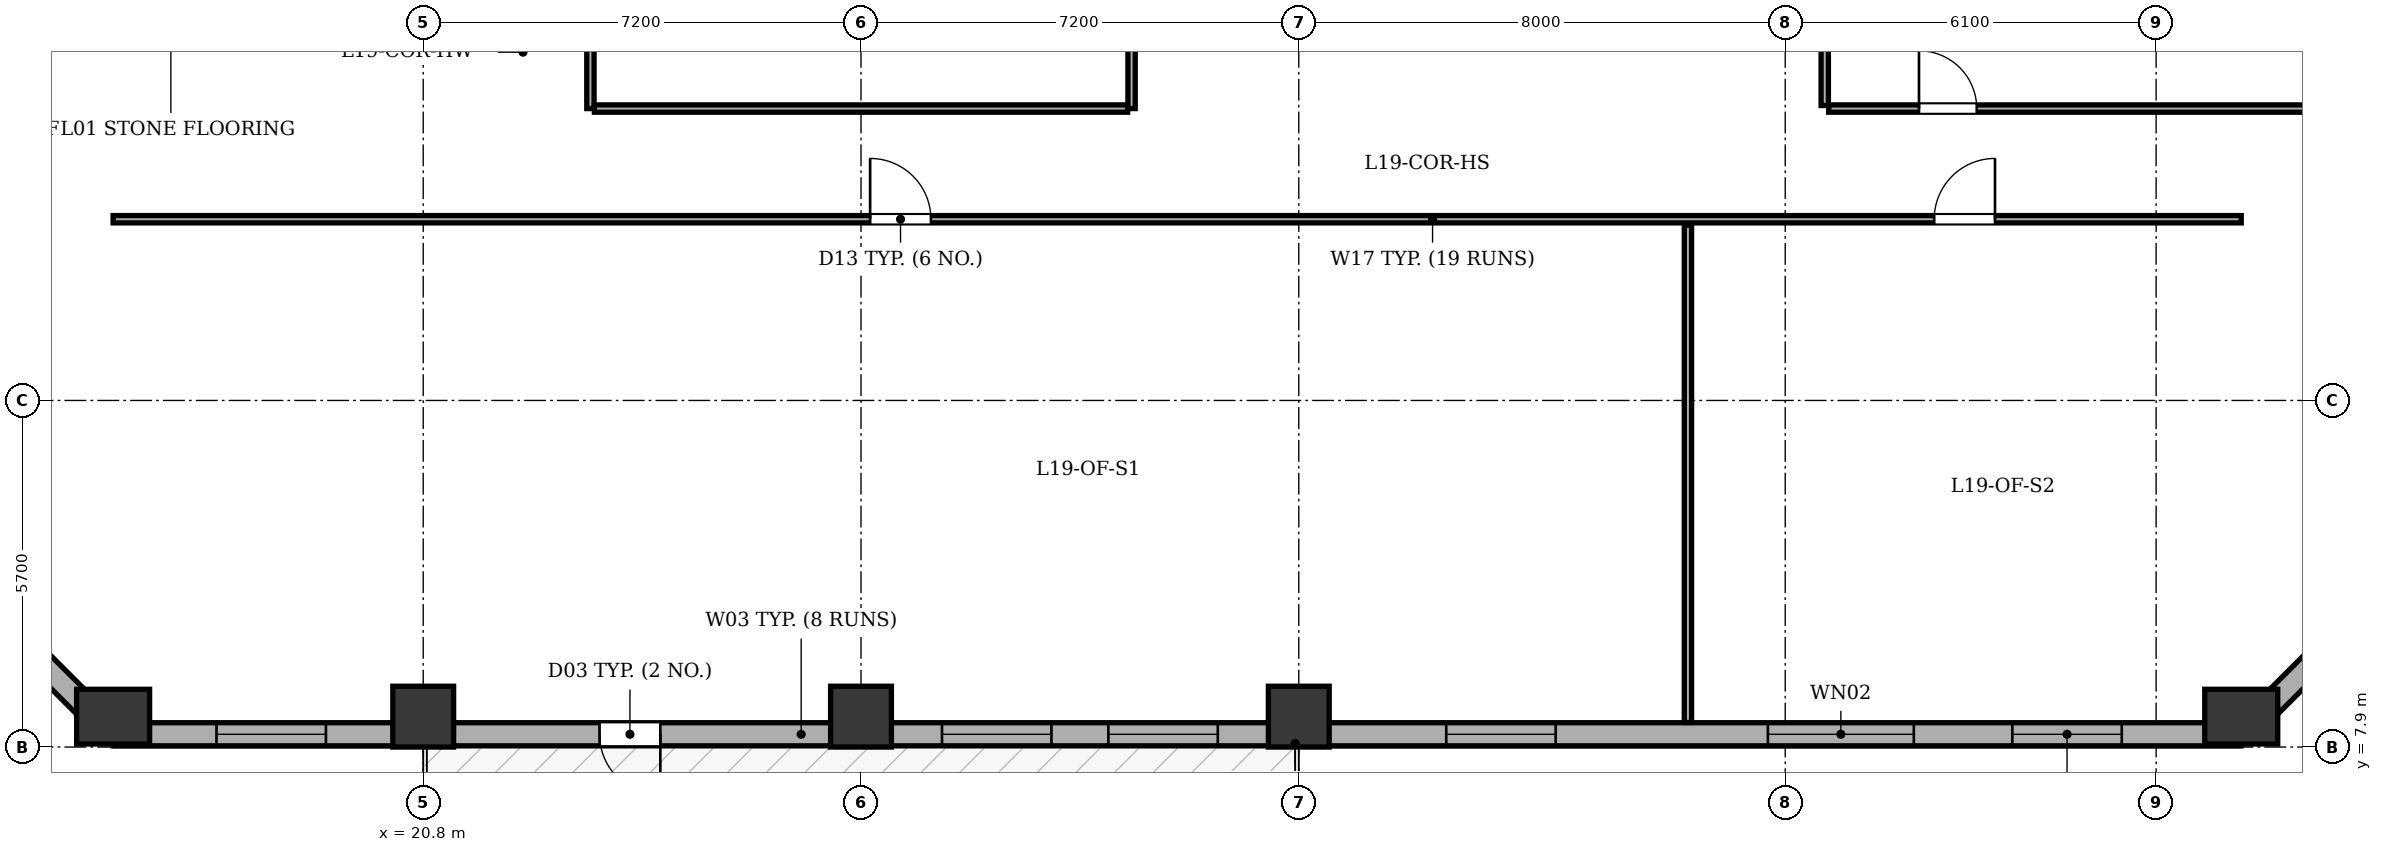
"""IFC4 building model, lengths in metres.
Left out: names, types, materials, properties, quantities, classifications, styles, units other than length and angle.
Written with IfcOpenShell. Run it as: python <this file> out.ifc"""

import sys

from ifc_helpers import new_model, si_unit, direction, frame, frame_2d, origin, origin_2d, place, context, subcontext, project, spatial, rectangle, extrude, element, fill, save


model = new_model("IFC4")
c1 = context("Model", 3, precision=1e-05, world=origin(), true_north=direction((0.0, 1.0)))
c2 = subcontext(c1, "Body", "Model", "MODEL_VIEW")
j1 = project(units=[si_unit("LENGTHUNIT", "METRE"), si_unit("PLANEANGLEUNIT", "RADIAN")], contexts=[c1])
p1 = place(None, origin())
s1 = spatial("IfcSite", under=j1, at=p1, CompositionType="ELEMENT")
p2 = place(p1, origin())
s2 = spatial("IfcBuilding", under=s1, at=p2, CompositionType="ELEMENT")
p3 = place(p2, frame((0.0, 0.0, 78.9)))
s3 = spatial("IfcBuildingStorey", under=s2, at=p3, CompositionType="ELEMENT", Elevation=78.9)
p4 = place(p3, frame((15.7, 8.4, 0.0), z_axis=(0.0, 0.0, 1.0), x_axis=(1.0, 0.0, 0.0)))
e1 = element("IfcColumn", 1, at=p4, inside=s3, PredefinedType="COLUMN", context=c2, shape_type="SweptSolid", body=[
    extrude(rectangle(XDim=0.9, YDim=1.2, at=origin_2d()), origin(), (0.0, 0.0, 1.0), 3.9),
])
for number, where, z_axis, x_axis in (
    (2, (20.8, 8.4, 0.0), (0.0, 0.0, 1.0), (1.0, 0.0, 0.0)),
    (3, (28.0, 8.4, 0.0), (0.0, 0.0, 1.0), (1.0, 0.0, 0.0)),
    (4, (35.2, 8.4, 0.0), (0.0, 0.0, 1.0), (1.0, 0.0, 0.0)),
):
    element("IfcColumn", number, at=place(p3, frame(where, z_axis=z_axis, x_axis=x_axis)), inside=s3, PredefinedType="COLUMN", context=c2, shape_type="SweptSolid", body=[
        extrude(rectangle(XDim=1.0, YDim=1.0, at=origin_2d()), origin(), (0.0, 0.0, 1.0), 3.9),
    ])
p5 = place(p3, frame((50.7, 8.4, 0.0), z_axis=(0.0, 0.0, 1.0), x_axis=(1.0, 0.0, 0.0)))
e5 = element("IfcColumn", 5, at=p5, inside=s3, PredefinedType="COLUMN", context=c2, shape_type="SweptSolid", body=[
    extrude(rectangle(XDim=0.9, YDim=1.2, at=origin_2d()), origin(), (0.0, 0.0, 1.0), 3.9),
])
p6 = place(p3, frame((50.7, 8.11, 0.0), z_axis=(0.0, 0.0, 1.0), x_axis=(-1.0, 0.0, 0.0)))
e6 = element("IfcWall", 6, at=p6, inside=s3, PredefinedType="STANDARD", context=c2, shape_type="SweptSolid", body=[
    extrude(rectangle(XDim=35.0, YDim=0.38, at=frame_2d((17.5, 0.0))), origin(), (0.0, 0.0, 1.0), 3.135),
])
p7 = place(p6, frame((26.0, 0.0, 0.0)))
e7 = element("IfcOpeningElement", 7, at=p7, cuts=e6, PredefinedType="OPENING", context=c2, shape_type="SweptSolid", body=[
    extrude(rectangle(XDim=1.0, YDim=2.02, at=frame_2d((0.5, 1.01))), frame((0.0, 0.2, 0.0), z_axis=(0.0, -1.0, 0.0), x_axis=(1.0, 0.0, 0.0)), (0.0, 0.0, 1.0), 0.4),
])
p8 = place(p6, frame((1.965, 0.0, 0.8)))
e8 = element("IfcOpeningElement", 8, at=p8, cuts=e6, PredefinedType="OPENING", context=c2, shape_type="SweptSolid", body=[
    extrude(rectangle(XDim=1.8, YDim=1.9, at=frame_2d((0.9, 0.95))), frame((0.0, 0.2, 0.0), z_axis=(0.0, -1.0, 0.0), x_axis=(1.0, 0.0, 0.0)), (0.0, 0.0, 1.0), 0.4),
])
p9 = place(p6, frame((5.385, 0.0, 0.8)))
e9 = element("IfcOpeningElement", 9, at=p9, cuts=e6, PredefinedType="OPENING", context=c2, shape_type="SweptSolid", body=[
    extrude(rectangle(XDim=2.4, YDim=1.9, at=frame_2d((1.2, 0.95))), frame((0.0, 0.2, 0.0), z_axis=(0.0, -1.0, 0.0), x_axis=(1.0, 0.0, 0.0)), (0.0, 0.0, 1.0), 0.4),
])
p10 = place(p6, frame((11.275, 0.0, 0.8)))
e10 = element("IfcOpeningElement", 10, at=p10, cuts=e6, PredefinedType="OPENING", context=c2, shape_type="SweptSolid", body=[
    extrude(rectangle(XDim=1.8, YDim=1.9, at=frame_2d((0.9, 0.95))), frame((0.0, 0.2, 0.0), z_axis=(0.0, -1.0, 0.0), x_axis=(1.0, 0.0, 0.0)), (0.0, 0.0, 1.0), 0.4),
])
p11 = place(p6, frame((16.832, 0.0, 0.8)))
e11 = element("IfcOpeningElement", 11, at=p11, cuts=e6, PredefinedType="OPENING", context=c2, shape_type="SweptSolid", body=[
    extrude(rectangle(XDim=1.8, YDim=1.9, at=frame_2d((0.9, 0.95))), frame((0.0, 0.2, 0.0), z_axis=(0.0, -1.0, 0.0), x_axis=(1.0, 0.0, 0.0)), (0.0, 0.0, 1.0), 0.4),
])
p12 = place(p6, frame((19.568, 0.0, 0.8)))
e12 = element("IfcOpeningElement", 12, at=p12, cuts=e6, PredefinedType="OPENING", context=c2, shape_type="SweptSolid", body=[
    extrude(rectangle(XDim=1.8, YDim=1.9, at=frame_2d((0.9, 0.95))), frame((0.0, 0.2, 0.0), z_axis=(0.0, -1.0, 0.0), x_axis=(1.0, 0.0, 0.0)), (0.0, 0.0, 1.0), 0.4),
])
p13 = place(p6, frame((31.5, 0.0, 0.8)))
e13 = element("IfcOpeningElement", 13, at=p13, cuts=e6, PredefinedType="OPENING", context=c2, shape_type="SweptSolid", body=[
    extrude(rectangle(XDim=1.8, YDim=1.9, at=frame_2d((0.9, 0.95))), frame((0.0, 0.2, 0.0), z_axis=(0.0, -1.0, 0.0), x_axis=(1.0, 0.0, 0.0)), (0.0, 0.0, 1.0), 0.4),
])
p14 = place(p3, frame((15.7, 8.11, 0.0), z_axis=(0.0, 0.0, 1.0), x_axis=(-0.707124801467, 0.707088760447, 0.0)))
e14 = element("IfcWall", 14, at=p14, inside=s3, PredefinedType="STANDARD", context=c2, shape_type="SweptSolid", body=[
    extrude(rectangle(XDim=6.774, YDim=0.38, at=frame_2d((3.387, 0.0))), origin(), (0.0, 0.0, 1.0), 3.135),
])
p15 = place(p14, frame((2.687, 0.0, 0.8)))
e15 = element("IfcOpeningElement", 15, at=p15, cuts=e14, PredefinedType="OPENING", context=c2, shape_type="SweptSolid", body=[
    extrude(rectangle(XDim=1.4, YDim=1.65, at=frame_2d((0.7, 0.825))), frame((0.0, 0.2, 0.0), z_axis=(0.0, -1.0, 0.0), x_axis=(1.0, 0.0, 0.0)), (0.0, 0.0, 1.0), 0.4),
])
p16 = place(p3, frame((55.49, 12.9, 0.0), z_axis=(0.0, 0.0, 1.0), x_axis=(-0.707124801467, -0.707088760447, 0.0)))
e16 = element("IfcWall", 16, at=p16, inside=s3, PredefinedType="STANDARD", context=c2, shape_type="SweptSolid", body=[
    extrude(rectangle(XDim=6.774, YDim=0.38, at=frame_2d((3.387, 0.0))), origin(), (0.0, 0.0, 1.0), 3.135),
])
p17 = place(p16, frame((2.687, 0.0, 0.8)))
e17 = element("IfcOpeningElement", 17, at=p17, cuts=e16, PredefinedType="OPENING", context=c2, shape_type="SweptSolid", body=[
    extrude(rectangle(XDim=1.4, YDim=1.65, at=frame_2d((0.7, 0.825))), frame((0.0, 0.2, 0.0), z_axis=(0.0, -1.0, 0.0), x_axis=(1.0, 0.0, 0.0)), (0.0, 0.0, 1.0), 0.4),
])
for number, where, z_axis, x_axis in (
    (18, (23.55, 18.4, 0.0), (0.0, 0.0, 1.0), (0.0, 1.0, 0.0)),
    (19, (32.45, 18.4, 0.0), (0.0, 0.0, 1.0), (0.0, 1.0, 0.0)),
):
    element("IfcWall", number, at=place(p3, frame(where, z_axis=z_axis, x_axis=x_axis)), inside=s3, PredefinedType="PARTITIONING", context=c2, shape_type="SweptSolid", body=[
        extrude(rectangle(XDim=3.485, YDim=0.12, at=frame_2d((1.743, 0.0))), origin(), (0.0, 0.0, 1.0), 3.6),
    ])
p18 = place(p3, frame((23.615, 18.4, 0.0), z_axis=(0.0, 0.0, 1.0), x_axis=(1.0, 0.0, 0.0)))
e20 = element("IfcWall", 20, at=p18, inside=s3, PredefinedType="PARTITIONING", context=c2, shape_type="SweptSolid", body=[
    extrude(rectangle(XDim=8.77, YDim=0.12, at=frame_2d((4.385, 0.0))), origin(), (0.0, 0.0, 1.0), 3.6),
])
p19 = place(p3, frame((15.7, 16.58, 0.0), z_axis=(0.0, 0.0, 1.0), x_axis=(1.0, 0.0, 0.0)))
e21 = element("IfcWall", 21, at=p19, inside=s3, PredefinedType="PARTITIONING", context=c2, shape_type="SweptSolid", body=[
    extrude(rectangle(XDim=35.0, YDim=0.12, at=frame_2d((17.5, 0.0))), origin(), (0.0, 0.0, 1.0), 3.6),
])
p20 = place(p19, frame((12.45, 0.0, 0.0)))
e22 = element("IfcOpeningElement", 22, at=p20, cuts=e21, PredefinedType="OPENING", context=c2, shape_type="SweptSolid", body=[
    extrude(rectangle(XDim=1.0, YDim=2.1, at=frame_2d((0.5, 1.05))), frame((0.0, 0.07, 0.0), z_axis=(0.0, -1.0, 0.0), x_axis=(1.0, 0.0, 0.0)), (0.0, 0.0, 1.0), 0.14),
])
p21 = place(p19, frame((29.95, 0.0, 0.0)))
e23 = element("IfcOpeningElement", 23, at=p21, cuts=e21, PredefinedType="OPENING", context=c2, shape_type="SweptSolid", body=[
    extrude(rectangle(XDim=1.0, YDim=2.1, at=frame_2d((0.5, 1.05))), frame((0.0, 0.07, 0.0), z_axis=(0.0, -1.0, 0.0), x_axis=(1.0, 0.0, 0.0)), (0.0, 0.0, 1.0), 0.14),
])
p22 = place(p3, frame((41.6, 8.305, 0.0), z_axis=(0.0, 0.0, 1.0), x_axis=(0.0, 1.0, 0.0)))
e24 = element("IfcWall", 24, at=p22, inside=s3, PredefinedType="PARTITIONING", context=c2, shape_type="SweptSolid", body=[
    extrude(rectangle(XDim=8.175, YDim=0.12, at=frame_2d((4.087, 0.0))), origin(), (0.0, 0.0, 1.0), 3.6),
])
p23 = place(p3, frame((43.85, 18.45, 0.0), z_axis=(0.0, 0.0, 1.0), x_axis=(0.0, 1.0, 0.0)))
e25 = element("IfcWall", 25, at=p23, inside=s3, PredefinedType="PARTITIONING", context=c2, shape_type="SweptSolid", body=[
    extrude(rectangle(XDim=17.5, YDim=0.12, at=frame_2d((8.75, 0.0))), origin(), (0.0, 0.0, 1.0), 3.6),
])
p24 = place(p3, frame((43.915, 18.4, 0.0), z_axis=(0.0, 0.0, 1.0), x_axis=(1.0, 0.0, 0.0)))
e26 = element("IfcWall", 26, at=p24, inside=s3, PredefinedType="PARTITIONING", context=c2, shape_type="SweptSolid", body=[
    extrude(rectangle(XDim=11.38, YDim=0.12, at=frame_2d((5.69, 0.0))), origin(), (0.0, 0.0, 1.0), 3.6),
])
p25 = place(p24, frame((1.485, 0.0, 0.0)))
e27 = element("IfcOpeningElement", 27, at=p25, cuts=e26, PredefinedType="OPENING", context=c2, shape_type="SweptSolid", body=[
    extrude(rectangle(XDim=0.95, YDim=2.1, at=frame_2d((0.475, 1.05))), frame((0.0, 0.07, 0.0), z_axis=(0.0, -1.0, 0.0), x_axis=(1.0, 0.0, 0.0)), (0.0, 0.0, 1.0), 0.14),
])
p26 = place(p7, origin())
e28 = element("IfcDoor", 28, at=p26, inside=s3, OperationType="SINGLE_SWING_LEFT", PredefinedType="DOOR", context=c2, shape_type="SweptSolid", body=[
    extrude(rectangle(XDim=1.0, YDim=2.02, at=frame_2d((0.5, 1.01))), frame((0.0, 0.025, 0.0), z_axis=(0.0, -1.0, 0.0), x_axis=(1.0, 0.0, 0.0)), (0.0, 0.0, 1.0), 0.05),
])
fill(e7, e28)
p27 = place(p8, origin())
e29 = element("IfcWindow", 29, at=p27, inside=s3, PartitioningType="SINGLE_PANEL", PredefinedType="WINDOW", context=c2, shape_type="SweptSolid", body=[
    extrude(rectangle(XDim=1.8, YDim=1.9, at=frame_2d((0.9, 0.95))), frame((0.0, -0.01, 0.0), z_axis=(0.0, -1.0, 0.0), x_axis=(1.0, 0.0, 0.0)), (0.0, 0.0, 1.0), 0.06),
])
fill(e8, e29)
p28 = place(p9, origin())
e30 = element("IfcWindow", 30, at=p28, inside=s3, PartitioningType="SINGLE_PANEL", PredefinedType="WINDOW", context=c2, shape_type="SweptSolid", body=[
    extrude(rectangle(XDim=2.4, YDim=1.9, at=frame_2d((1.2, 0.95))), frame((0.0, -0.01, 0.0), z_axis=(0.0, -1.0, 0.0), x_axis=(1.0, 0.0, 0.0)), (0.0, 0.0, 1.0), 0.06),
])
fill(e9, e30)
p29 = place(p10, origin())
e31 = element("IfcWindow", 31, at=p29, inside=s3, PartitioningType="SINGLE_PANEL", PredefinedType="WINDOW", context=c2, shape_type="SweptSolid", body=[
    extrude(rectangle(XDim=1.8, YDim=1.9, at=frame_2d((0.9, 0.95))), frame((0.0, -0.01, 0.0), z_axis=(0.0, -1.0, 0.0), x_axis=(1.0, 0.0, 0.0)), (0.0, 0.0, 1.0), 0.06),
])
fill(e10, e31)
p30 = place(p11, origin())
e32 = element("IfcWindow", 32, at=p30, inside=s3, PartitioningType="SINGLE_PANEL", PredefinedType="WINDOW", context=c2, shape_type="SweptSolid", body=[
    extrude(rectangle(XDim=1.8, YDim=1.9, at=frame_2d((0.9, 0.95))), frame((0.0, -0.01, 0.0), z_axis=(0.0, -1.0, 0.0), x_axis=(1.0, 0.0, 0.0)), (0.0, 0.0, 1.0), 0.06),
])
fill(e11, e32)
p31 = place(p12, origin())
e33 = element("IfcWindow", 33, at=p31, inside=s3, PartitioningType="SINGLE_PANEL", PredefinedType="WINDOW", context=c2, shape_type="SweptSolid", body=[
    extrude(rectangle(XDim=1.8, YDim=1.9, at=frame_2d((0.9, 0.95))), frame((0.0, -0.01, 0.0), z_axis=(0.0, -1.0, 0.0), x_axis=(1.0, 0.0, 0.0)), (0.0, 0.0, 1.0), 0.06),
])
fill(e12, e33)
p32 = place(p13, origin())
e34 = element("IfcWindow", 34, at=p32, inside=s3, PartitioningType="SINGLE_PANEL", PredefinedType="WINDOW", context=c2, shape_type="SweptSolid", body=[
    extrude(rectangle(XDim=1.8, YDim=1.9, at=frame_2d((0.9, 0.95))), frame((0.0, -0.01, 0.0), z_axis=(0.0, -1.0, 0.0), x_axis=(1.0, 0.0, 0.0)), (0.0, 0.0, 1.0), 0.06),
])
fill(e13, e34)
p33 = place(p20, origin())
e35 = element("IfcDoor", 35, at=p33, inside=s3, OperationType="SINGLE_SWING_LEFT", PredefinedType="DOOR", context=c2, shape_type="SweptSolid", body=[
    extrude(rectangle(XDim=1.0, YDim=2.1, at=frame_2d((0.5, 1.05))), frame((0.0, 0.025, 0.0), z_axis=(0.0, -1.0, 0.0), x_axis=(1.0, 0.0, 0.0)), (0.0, 0.0, 1.0), 0.05),
])
fill(e22, e35)
p34 = place(p21, origin())
e36 = element("IfcDoor", 36, at=p34, inside=s3, OperationType="SINGLE_SWING_RIGHT", PredefinedType="DOOR", context=c2, shape_type="SweptSolid", body=[
    extrude(rectangle(XDim=1.0, YDim=2.1, at=frame_2d((0.5, 1.05))), frame((0.0, 0.025, 0.0), z_axis=(0.0, -1.0, 0.0), x_axis=(1.0, 0.0, 0.0)), (0.0, 0.0, 1.0), 0.05),
])
fill(e23, e36)
p35 = place(p25, origin())
e37 = element("IfcDoor", 37, at=p35, inside=s3, OperationType="SINGLE_SWING_LEFT", PredefinedType="DOOR", context=c2, shape_type="SweptSolid", body=[
    extrude(rectangle(XDim=0.95, YDim=2.1, at=frame_2d((0.475, 1.05))), frame((0.0, 0.025, 0.0), z_axis=(0.0, -1.0, 0.0), x_axis=(1.0, 0.0, 0.0)), (0.0, 0.0, 1.0), 0.05),
])
fill(e27, e37)
save(model, sys.argv[1])
